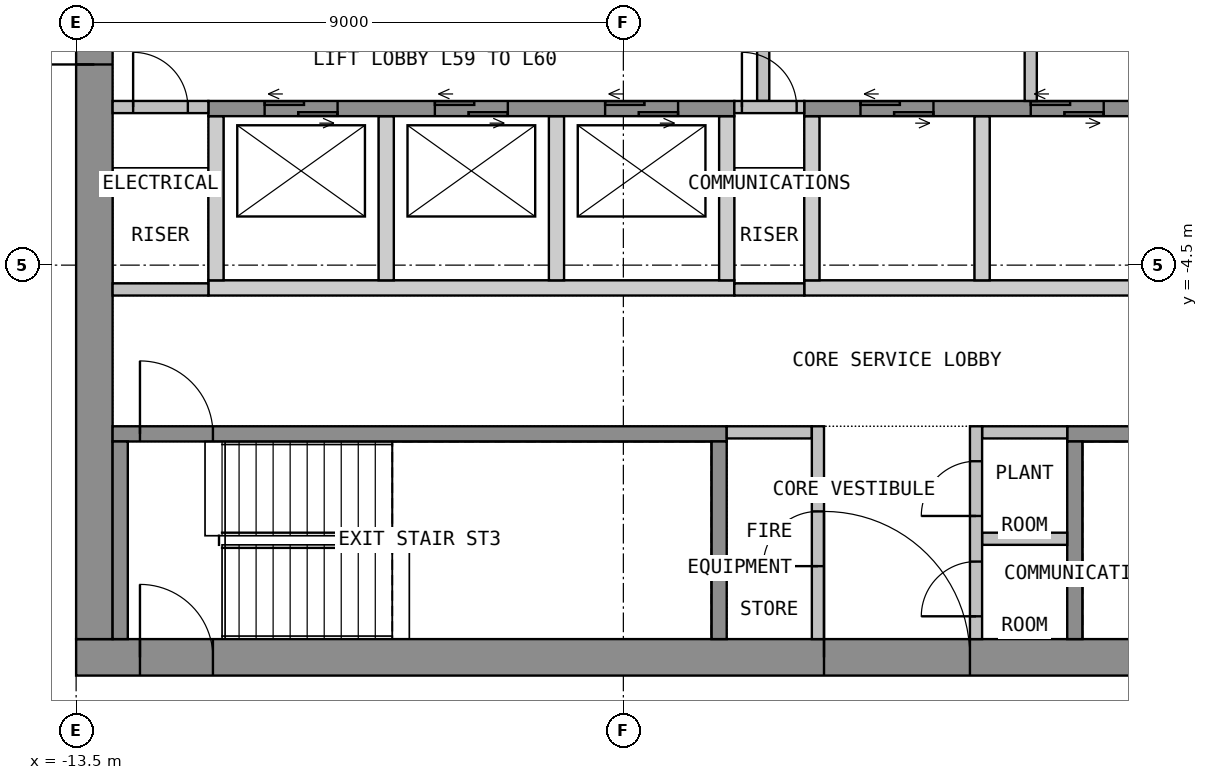
"""IFC4 building model, lengths in metres.
Left out: names, types, materials, properties, quantities, classifications, styles, units other than length and angle.
Written with IfcOpenShell. Run it as: python <this file> out.ifc"""

import sys

from ifc_helpers import new_model, si_unit, direction, frame, frame_2d, origin, place, context, subcontext, project, spatial, polyline, rectangle, outline, extrude, element, fill, save


model = new_model("IFC4")
c1 = context("Model", 3, precision=1e-05, world=origin(), true_north=direction((0.0, 1.0)))
c2 = subcontext(c1, "Body", "Model", "MODEL_VIEW")
j1 = project(units=[si_unit("LENGTHUNIT", "METRE"), si_unit("PLANEANGLEUNIT", "RADIAN")], contexts=[c1])
p1 = place(None, origin())
s1 = spatial("IfcSite", under=j1, at=p1, CompositionType="ELEMENT")
p2 = place(p1, origin())
s2 = spatial("IfcBuilding", under=s1, at=p2, CompositionType="ELEMENT")
p3 = place(p2, frame((0.0, 0.0, 235.2)))
s3 = spatial("IfcBuildingStorey", under=s2, at=p3, CompositionType="ELEMENT", Elevation=235.2)
p4 = place(p3, frame((-13.5, -10.95, 0.0), z_axis=(0.0, 0.0, 1.0), x_axis=(1.0, 0.0, 0.0)))
e1 = element("IfcWall", 1, at=p4, inside=s3, PredefinedType="SHEAR", context=c2, shape_type="SweptSolid", body=[
    extrude(rectangle(XDim=27.0, YDim=0.6, at=frame_2d((13.5, 0.0))), origin(), (0.0, 0.0, 1.0), 3.575),
])
p5 = place(p4, frame((12.3, 0.0, 0.0)))
e2 = element("IfcOpeningElement", 2, at=p5, cuts=e1, PredefinedType="OPENING", context=c2, shape_type="SweptSolid", body=[
    extrude(rectangle(XDim=2.4, YDim=2.1, at=frame_2d((1.2, 1.05))), frame((0.0, 0.31, 0.0), z_axis=(0.0, -1.0, 0.0), x_axis=(1.0, 0.0, 0.0)), (0.0, 0.0, 1.0), 0.62),
])
p6 = place(p4, frame((1.05, 0.0, 0.0)))
e3 = element("IfcOpeningElement", 3, at=p6, cuts=e1, PredefinedType="OPENING", context=c2, shape_type="SweptSolid", body=[
    extrude(rectangle(XDim=1.2, YDim=2.1, at=frame_2d((0.6, 1.05))), frame((0.0, 0.31, 0.0), z_axis=(0.0, -1.0, 0.0), x_axis=(1.0, 0.0, 0.0)), (0.0, 0.0, 1.0), 0.62),
])
p7 = place(p4, frame((24.75, 0.0, 0.0)))
e4 = element("IfcOpeningElement", 4, at=p7, cuts=e1, PredefinedType="OPENING", context=c2, shape_type="SweptSolid", body=[
    extrude(rectangle(XDim=1.2, YDim=2.1, at=frame_2d((0.6, 1.05))), frame((0.0, 0.31, 0.0), z_axis=(0.0, -1.0, 0.0), x_axis=(1.0, 0.0, 0.0)), (0.0, 0.0, 1.0), 0.62),
])
p8 = place(p3, frame((-13.2, -10.65, 0.0), z_axis=(0.0, 0.0, 1.0), x_axis=(0.0, 1.0, 0.0)))
e5 = element("IfcWall", 5, at=p8, inside=s3, PredefinedType="SHEAR", context=c2, shape_type="SweptSolid", body=[
    extrude(rectangle(XDim=21.3, YDim=0.6, at=frame_2d((10.65, 0.0))), origin(), (0.0, 0.0, 1.0), 3.575),
])
p9 = place(p8, frame((9.45, 0.0, 0.0)))
e6 = element("IfcOpeningElement", 6, at=p9, cuts=e5, PredefinedType="OPENING", context=c2, shape_type="SweptSolid", body=[
    extrude(rectangle(XDim=2.4, YDim=2.1, at=frame_2d((1.2, 1.05))), frame((0.0, 0.31, 0.0), z_axis=(0.0, -1.0, 0.0), x_axis=(1.0, 0.0, 0.0)), (0.0, 0.0, 1.0), 0.62),
])
p10 = place(p3, origin())
e7 = element("IfcWall", 7, at=p10, inside=s3, PredefinedType="SHEAR", context=c2, shape_type="SweptSolid", body=[
    extrude(outline(polyline([(-11.325, -5.0), (-2.675, -5.0), (-2.675, -4.75), (-11.325, -4.75), (-11.325, -5.0)])), origin(), (0.0, 0.0, 1.0), 3.575),
])
p11 = place(p3, origin())
e8 = element("IfcWall", 8, at=p11, inside=s3, PredefinedType="SHEAR", context=c2, shape_type="SweptSolid", body=[
    extrude(outline(polyline([(-1.525, -5.0), (12.9, -5.0), (12.9, -4.75), (-1.525, -4.75), (-1.525, -5.0)])), origin(), (0.0, 0.0, 1.0), 3.575),
])
p12 = place(p3, origin())
e9 = element("IfcWall", 9, at=p12, inside=s3, PredefinedType="SHEAR", context=c2, shape_type="SweptSolid", body=[
    extrude(outline(polyline([(-11.325, -4.75), (-11.075, -4.75), (-11.075, -2.05), (-11.325, -2.05), (-11.325, -4.75)])), origin(), (0.0, 0.0, 1.0), 3.575),
])
p13 = place(p3, origin())
e10 = element("IfcWall", 10, at=p13, inside=s3, PredefinedType="SHEAR", context=c2, shape_type="SweptSolid", body=[
    extrude(outline(polyline([(-8.525, -4.75), (-8.275, -4.75), (-8.275, -2.05), (-8.525, -2.05), (-8.525, -4.75)])), origin(), (0.0, 0.0, 1.0), 3.575),
])
p14 = place(p3, origin())
e11 = element("IfcWall", 11, at=p14, inside=s3, PredefinedType="SHEAR", context=c2, shape_type="SweptSolid", body=[
    extrude(outline(polyline([(-5.725, -4.75), (-5.475, -4.75), (-5.475, -2.05), (-5.725, -2.05), (-5.725, -4.75)])), origin(), (0.0, 0.0, 1.0), 3.575),
])
p15 = place(p3, origin())
e12 = element("IfcWall", 12, at=p15, inside=s3, PredefinedType="SHEAR", context=c2, shape_type="SweptSolid", body=[
    extrude(outline(polyline([(-2.925, -4.75), (-2.675, -4.75), (-2.675, -2.05), (-2.925, -2.05), (-2.925, -4.75)])), origin(), (0.0, 0.0, 1.0), 3.575),
])
p16 = place(p3, origin())
e13 = element("IfcWall", 13, at=p16, inside=s3, PredefinedType="SHEAR", context=c2, shape_type="SweptSolid", body=[
    extrude(outline(polyline([(-1.525, -4.75), (-1.275, -4.75), (-1.275, -2.05), (-1.525, -2.05), (-1.525, -4.75)])), origin(), (0.0, 0.0, 1.0), 3.575),
])
p17 = place(p3, origin())
e14 = element("IfcWall", 14, at=p17, inside=s3, PredefinedType="SHEAR", context=c2, shape_type="SweptSolid", body=[
    extrude(outline(polyline([(1.275, -4.75), (1.525, -4.75), (1.525, -2.05), (1.275, -2.05), (1.275, -4.75)])), origin(), (0.0, 0.0, 1.0), 3.575),
])
p18 = place(p3, frame((-11.325, -1.925, 0.0), z_axis=(0.0, 0.0, 1.0), x_axis=(1.0, 0.0, 0.0)))
e15 = element("IfcWall", 15, at=p18, inside=s3, PredefinedType="SHEAR", context=c2, shape_type="SweptSolid", body=[
    extrude(rectangle(XDim=8.65, YDim=0.25, at=frame_2d((4.325, 0.0))), origin(), (0.0, 0.0, 1.0), 3.575),
])
p19 = place(p18, frame((0.925, 0.0, 0.0)))
e16 = element("IfcOpeningElement", 16, at=p19, cuts=e15, PredefinedType="OPENING", context=c2, shape_type="SweptSolid", body=[
    extrude(rectangle(XDim=1.2, YDim=2.1, at=frame_2d((0.6, 1.05))), frame((0.0, 0.135, 0.0), z_axis=(0.0, -1.0, 0.0), x_axis=(1.0, 0.0, 0.0)), (0.0, 0.0, 1.0), 0.27),
])
p20 = place(p18, frame((3.725, 0.0, 0.0)))
e17 = element("IfcOpeningElement", 17, at=p20, cuts=e15, PredefinedType="OPENING", context=c2, shape_type="SweptSolid", body=[
    extrude(rectangle(XDim=1.2, YDim=2.1, at=frame_2d((0.6, 1.05))), frame((0.0, 0.135, 0.0), z_axis=(0.0, -1.0, 0.0), x_axis=(1.0, 0.0, 0.0)), (0.0, 0.0, 1.0), 0.27),
])
p21 = place(p18, frame((6.525, 0.0, 0.0)))
e18 = element("IfcOpeningElement", 18, at=p21, cuts=e15, PredefinedType="OPENING", context=c2, shape_type="SweptSolid", body=[
    extrude(rectangle(XDim=1.2, YDim=2.1, at=frame_2d((0.6, 1.05))), frame((0.0, 0.135, 0.0), z_axis=(0.0, -1.0, 0.0), x_axis=(1.0, 0.0, 0.0)), (0.0, 0.0, 1.0), 0.27),
])
p22 = place(p3, frame((-1.525, -1.925, 0.0), z_axis=(0.0, 0.0, 1.0), x_axis=(1.0, 0.0, 0.0)))
e19 = element("IfcWall", 19, at=p22, inside=s3, PredefinedType="SHEAR", context=c2, shape_type="SweptSolid", body=[
    extrude(rectangle(XDim=14.425, YDim=0.25, at=frame_2d((7.212, 0.0))), origin(), (0.0, 0.0, 1.0), 3.575),
])
p23 = place(p22, frame((0.925, 0.0, 0.0)))
e20 = element("IfcOpeningElement", 20, at=p23, cuts=e19, PredefinedType="OPENING", context=c2, shape_type="SweptSolid", body=[
    extrude(rectangle(XDim=1.2, YDim=2.1, at=frame_2d((0.6, 1.05))), frame((0.0, 0.135, 0.0), z_axis=(0.0, -1.0, 0.0), x_axis=(1.0, 0.0, 0.0)), (0.0, 0.0, 1.0), 0.27),
])
p24 = place(p22, frame((3.725, 0.0, 0.0)))
e21 = element("IfcOpeningElement", 21, at=p24, cuts=e19, PredefinedType="OPENING", context=c2, shape_type="SweptSolid", body=[
    extrude(rectangle(XDim=1.2, YDim=2.1, at=frame_2d((0.6, 1.05))), frame((0.0, 0.135, 0.0), z_axis=(0.0, -1.0, 0.0), x_axis=(1.0, 0.0, 0.0)), (0.0, 0.0, 1.0), 0.27),
])
p25 = place(p22, frame((6.525, 0.0, 0.0)))
e22 = element("IfcOpeningElement", 22, at=p25, cuts=e19, PredefinedType="OPENING", context=c2, shape_type="SweptSolid", body=[
    extrude(rectangle(XDim=1.2, YDim=2.1, at=frame_2d((0.6, 1.05))), frame((0.0, 0.135, 0.0), z_axis=(0.0, -1.0, 0.0), x_axis=(1.0, 0.0, 0.0)), (0.0, 0.0, 1.0), 0.27),
])
p26 = place(p22, frame((9.325, 0.0, 0.0)))
e23 = element("IfcOpeningElement", 23, at=p26, cuts=e19, PredefinedType="OPENING", context=c2, shape_type="SweptSolid", body=[
    extrude(rectangle(XDim=1.2, YDim=2.1, at=frame_2d((0.6, 1.05))), frame((0.0, 0.135, 0.0), z_axis=(0.0, -1.0, 0.0), x_axis=(1.0, 0.0, 0.0)), (0.0, 0.0, 1.0), 0.27),
])
p27 = place(p22, frame((12.125, 0.0, 0.0)))
e24 = element("IfcOpeningElement", 24, at=p27, cuts=e19, PredefinedType="OPENING", context=c2, shape_type="SweptSolid", body=[
    extrude(rectangle(XDim=1.2, YDim=2.1, at=frame_2d((0.6, 1.05))), frame((0.0, 0.135, 0.0), z_axis=(0.0, -1.0, 0.0), x_axis=(1.0, 0.0, 0.0)), (0.0, 0.0, 1.0), 0.27),
])
p28 = place(p3, frame((-2.2, -1.8, 0.0), z_axis=(0.0, 0.0, 1.0), x_axis=(0.0, 1.0, 0.0)))
e25 = element("IfcWall", 25, at=p28, inside=s3, PredefinedType="PARTITIONING", context=c2, shape_type="SweptSolid", body=[
    extrude(rectangle(XDim=3.6, YDim=0.2, at=frame_2d((1.8, 0.0))), origin(), (0.0, 0.0, 1.0), 3.575),
])
p29 = place(p28, frame((1.2, 0.0, 0.0)))
e26 = element("IfcOpeningElement", 26, at=p29, cuts=e25, PredefinedType="OPENING", context=c2, shape_type="SweptSolid", body=[
    extrude(rectangle(XDim=1.2, YDim=2.1, at=frame_2d((0.6, 1.05))), frame((0.0, 0.11, 0.0), z_axis=(0.0, -1.0, 0.0), x_axis=(1.0, 0.0, 0.0)), (0.0, 0.0, 1.0), 0.22),
])
p30 = place(p3, frame((2.2, -1.8, 0.0), z_axis=(0.0, 0.0, 1.0), x_axis=(0.0, 1.0, 0.0)))
e27 = element("IfcWall", 27, at=p30, inside=s3, PredefinedType="PARTITIONING", context=c2, shape_type="SweptSolid", body=[
    extrude(rectangle(XDim=3.6, YDim=0.2, at=frame_2d((1.8, 0.0))), origin(), (0.0, 0.0, 1.0), 3.575),
])
p31 = place(p30, frame((1.2, 0.0, 0.0)))
e28 = element("IfcOpeningElement", 28, at=p31, cuts=e27, PredefinedType="OPENING", context=c2, shape_type="SweptSolid", body=[
    extrude(rectangle(XDim=1.2, YDim=2.1, at=frame_2d((0.6, 1.05))), frame((0.0, 0.11, 0.0), z_axis=(0.0, -1.0, 0.0), x_axis=(1.0, 0.0, 0.0)), (0.0, 0.0, 1.0), 0.22),
])
p32 = place(p3, frame((-12.9, -7.275, 0.0), z_axis=(0.0, 0.0, 1.0), x_axis=(1.0, 0.0, 0.0)))
e29 = element("IfcWall", 29, at=p32, inside=s3, PredefinedType="SHEAR", context=c2, shape_type="SweptSolid", body=[
    extrude(rectangle(XDim=10.1, YDim=0.25, at=frame_2d((5.05, 0.0))), origin(), (0.0, 0.0, 1.0), 3.575),
])
p33 = place(p32, frame((0.45, 0.0, 0.0)))
e30 = element("IfcOpeningElement", 30, at=p33, cuts=e29, PredefinedType="OPENING", context=c2, shape_type="SweptSolid", body=[
    extrude(rectangle(XDim=1.2, YDim=2.1, at=frame_2d((0.6, 1.05))), frame((0.0, 0.135, 0.0), z_axis=(0.0, -1.0, 0.0), x_axis=(1.0, 0.0, 0.0)), (0.0, 0.0, 1.0), 0.27),
])
for number, where, z_axis, x_axis in (
    (31, (-12.775, -10.65, 0.0), (0.0, 0.0, 1.0), (0.0, 1.0, 0.0)),
    (32, (-2.925, -10.65, 0.0), (0.0, 0.0, 1.0), (0.0, 1.0, 0.0)),
):
    element("IfcWall", number, at=place(p3, frame(where, z_axis=z_axis, x_axis=x_axis)), inside=s3, PredefinedType="SHEAR", context=c2, shape_type="SweptSolid", body=[
        extrude(rectangle(XDim=3.25, YDim=0.25, at=frame_2d((1.625, 0.0))), origin(), (0.0, 0.0, 1.0), 3.575),
    ])
p34 = place(p3, frame((2.8, -7.275, 0.0), z_axis=(0.0, 0.0, 1.0), x_axis=(1.0, 0.0, 0.0)))
e33 = element("IfcWall", 33, at=p34, inside=s3, PredefinedType="SHEAR", context=c2, shape_type="SweptSolid", body=[
    extrude(rectangle(XDim=10.1, YDim=0.25, at=frame_2d((5.05, 0.0))), origin(), (0.0, 0.0, 1.0), 3.575),
])
p35 = place(p34, frame((8.45, 0.0, 0.0)))
e34 = element("IfcOpeningElement", 34, at=p35, cuts=e33, PredefinedType="OPENING", context=c2, shape_type="SweptSolid", body=[
    extrude(rectangle(XDim=1.2, YDim=2.1, at=frame_2d((0.6, 1.05))), frame((0.0, 0.135, 0.0), z_axis=(0.0, -1.0, 0.0), x_axis=(1.0, 0.0, 0.0)), (0.0, 0.0, 1.0), 0.27),
])
p36 = place(p3, frame((2.925, -10.65, 0.0), z_axis=(0.0, 0.0, 1.0), x_axis=(0.0, 1.0, 0.0)))
e35 = element("IfcWall", 35, at=p36, inside=s3, PredefinedType="SHEAR", context=c2, shape_type="SweptSolid", body=[
    extrude(rectangle(XDim=3.25, YDim=0.25, at=frame_2d((1.625, 0.0))), origin(), (0.0, 0.0, 1.0), 3.575),
])
for number, where, z_axis, x_axis in (
    (36, (-2.8, -7.25, 0.0), (0.0, 0.0, 1.0), (1.0, 0.0, 0.0)),
    (37, (1.4, -7.25, 0.0), (0.0, 0.0, 1.0), (1.0, 0.0, 0.0)),
    (38, (1.4, -9.0, 0.0), (0.0, 0.0, 1.0), (1.0, 0.0, 0.0)),
):
    element("IfcWall", number, at=place(p3, frame(where, z_axis=z_axis, x_axis=x_axis)), inside=s3, PredefinedType="PARTITIONING", context=c2, shape_type="SweptSolid", body=[
        extrude(rectangle(XDim=1.4, YDim=0.2, at=frame_2d((0.7, 0.0))), origin(), (0.0, 0.0, 1.0), 3.575),
    ])
p37 = place(p3, frame((-1.3, -10.65, 0.0), z_axis=(0.0, 0.0, 1.0), x_axis=(0.0, 1.0, 0.0)))
e39 = element("IfcWall", 39, at=p37, inside=s3, PredefinedType="PARTITIONING", context=c2, shape_type="SweptSolid", body=[
    extrude(rectangle(XDim=3.5, YDim=0.2, at=frame_2d((1.75, 0.0))), origin(), (0.0, 0.0, 1.0), 3.575),
])
p38 = place(p37, frame((1.2, 0.0, 0.0)))
e40 = element("IfcOpeningElement", 40, at=p38, cuts=e39, PredefinedType="OPENING", context=c2, shape_type="SweptSolid", body=[
    extrude(rectangle(XDim=0.9, YDim=2.1, at=frame_2d((0.45, 1.05))), frame((0.0, 0.11, 0.0), z_axis=(0.0, -1.0, 0.0), x_axis=(1.0, 0.0, 0.0)), (0.0, 0.0, 1.0), 0.22),
])
p39 = place(p3, frame((1.3, -10.65, 0.0), z_axis=(0.0, 0.0, 1.0), x_axis=(0.0, 1.0, 0.0)))
e41 = element("IfcWall", 41, at=p39, inside=s3, PredefinedType="PARTITIONING", context=c2, shape_type="SweptSolid", body=[
    extrude(rectangle(XDim=3.5, YDim=0.2, at=frame_2d((1.75, 0.0))), origin(), (0.0, 0.0, 1.0), 3.575),
])
p40 = place(p39, frame((0.375, 0.0, 0.0)))
e42 = element("IfcOpeningElement", 42, at=p40, cuts=e41, PredefinedType="OPENING", context=c2, shape_type="SweptSolid", body=[
    extrude(rectangle(XDim=0.9, YDim=2.1, at=frame_2d((0.45, 1.05))), frame((0.0, 0.11, 0.0), z_axis=(0.0, -1.0, 0.0), x_axis=(1.0, 0.0, 0.0)), (0.0, 0.0, 1.0), 0.22),
])
p41 = place(p39, frame((2.025, 0.0, 0.0)))
e43 = element("IfcOpeningElement", 43, at=p41, cuts=e41, PredefinedType="OPENING", context=c2, shape_type="SweptSolid", body=[
    extrude(rectangle(XDim=0.9, YDim=2.1, at=frame_2d((0.45, 1.05))), frame((0.0, 0.11, 0.0), z_axis=(0.0, -1.0, 0.0), x_axis=(1.0, 0.0, 0.0)), (0.0, 0.0, 1.0), 0.22),
])
p42 = place(p3, frame((-12.9, -1.9, 0.0), z_axis=(0.0, 0.0, 1.0), x_axis=(1.0, 0.0, 0.0)))
e44 = element("IfcWall", 44, at=p42, inside=s3, PredefinedType="PARTITIONING", context=c2, shape_type="SweptSolid", body=[
    extrude(rectangle(XDim=1.575, YDim=0.2, at=frame_2d((0.788, 0.0))), origin(), (0.0, 0.0, 1.0), 3.575),
])
p43 = place(p42, frame((0.337, 0.0, 0.0)))
e45 = element("IfcOpeningElement", 45, at=p43, cuts=e44, PredefinedType="OPENING", context=c2, shape_type="SweptSolid", body=[
    extrude(rectangle(XDim=0.9, YDim=2.1, at=frame_2d((0.45, 1.05))), frame((0.0, 0.11, 0.0), z_axis=(0.0, -1.0, 0.0), x_axis=(1.0, 0.0, 0.0)), (0.0, 0.0, 1.0), 0.22),
])
p44 = place(p3, frame((-12.9, -4.9, 0.0), z_axis=(0.0, 0.0, 1.0), x_axis=(1.0, 0.0, 0.0)))
e46 = element("IfcWall", 46, at=p44, inside=s3, PredefinedType="PARTITIONING", context=c2, shape_type="SweptSolid", body=[
    extrude(rectangle(XDim=1.575, YDim=0.2, at=frame_2d((0.788, 0.0))), origin(), (0.0, 0.0, 1.0), 3.575),
])
p45 = place(p3, frame((-2.675, -1.9, 0.0), z_axis=(0.0, 0.0, 1.0), x_axis=(1.0, 0.0, 0.0)))
e47 = element("IfcWall", 47, at=p45, inside=s3, PredefinedType="PARTITIONING", context=c2, shape_type="SweptSolid", body=[
    extrude(rectangle(XDim=1.15, YDim=0.2, at=frame_2d((0.575, 0.0))), origin(), (0.0, 0.0, 1.0), 3.575),
])
p46 = place(p45, frame((0.125, 0.0, 0.0)))
e48 = element("IfcOpeningElement", 48, at=p46, cuts=e47, PredefinedType="OPENING", context=c2, shape_type="SweptSolid", body=[
    extrude(rectangle(XDim=0.9, YDim=2.1, at=frame_2d((0.45, 1.05))), frame((0.0, 0.11, 0.0), z_axis=(0.0, -1.0, 0.0), x_axis=(1.0, 0.0, 0.0)), (0.0, 0.0, 1.0), 0.22),
])
p47 = place(p3, frame((-2.675, -4.9, 0.0), z_axis=(0.0, 0.0, 1.0), x_axis=(1.0, 0.0, 0.0)))
e49 = element("IfcWall", 49, at=p47, inside=s3, PredefinedType="PARTITIONING", context=c2, shape_type="SweptSolid", body=[
    extrude(rectangle(XDim=1.15, YDim=0.2, at=frame_2d((0.575, 0.0))), origin(), (0.0, 0.0, 1.0), 3.575),
])
p48 = place(p9, origin())
e50 = element("IfcDoor", 50, at=p48, inside=s3, OperationType="DOUBLE_DOOR_DOUBLE_SWING", PredefinedType="DOOR", context=c2, shape_type="SweptSolid", body=[
    extrude(rectangle(XDim=2.4, YDim=2.1, at=frame_2d((1.2, 1.05))), frame((0.0, 0.025, 0.0), z_axis=(0.0, -1.0, 0.0), x_axis=(1.0, 0.0, 0.0)), (0.0, 0.0, 1.0), 0.05),
])
fill(e6, e50)
p49 = place(p5, origin())
e51 = element("IfcDoor", 51, at=p49, inside=s3, OperationType="DOUBLE_DOOR_DOUBLE_SWING", PredefinedType="DOOR", context=c2, shape_type="SweptSolid", body=[
    extrude(rectangle(XDim=2.4, YDim=2.1, at=frame_2d((1.2, 1.05))), frame((0.0, 0.025, 0.0), z_axis=(0.0, -1.0, 0.0), x_axis=(1.0, 0.0, 0.0)), (0.0, 0.0, 1.0), 0.05),
])
fill(e2, e51)
p50 = place(p6, origin())
e52 = element("IfcDoor", 52, at=p50, inside=s3, OperationType="SINGLE_SWING_RIGHT", PredefinedType="DOOR", context=c2, shape_type="SweptSolid", body=[
    extrude(rectangle(XDim=1.2, YDim=2.1, at=frame_2d((0.6, 1.05))), frame((0.0, 0.025, 0.0), z_axis=(0.0, -1.0, 0.0), x_axis=(1.0, 0.0, 0.0)), (0.0, 0.0, 1.0), 0.05),
])
fill(e3, e52)
p51 = place(p19, origin())
e53 = element("IfcDoor", 53, at=p51, inside=s3, OperationType="DOUBLE_DOOR_SLIDING", PredefinedType="DOOR", context=c2, shape_type="SweptSolid", body=[
    extrude(rectangle(XDim=1.2, YDim=2.1, at=frame_2d((0.6, 1.05))), frame((0.0, 0.025, 0.0), z_axis=(0.0, -1.0, 0.0), x_axis=(1.0, 0.0, 0.0)), (0.0, 0.0, 1.0), 0.05),
])
fill(e16, e53)
p52 = place(p20, origin())
e54 = element("IfcDoor", 54, at=p52, inside=s3, OperationType="DOUBLE_DOOR_SLIDING", PredefinedType="DOOR", context=c2, shape_type="SweptSolid", body=[
    extrude(rectangle(XDim=1.2, YDim=2.1, at=frame_2d((0.6, 1.05))), frame((0.0, 0.025, 0.0), z_axis=(0.0, -1.0, 0.0), x_axis=(1.0, 0.0, 0.0)), (0.0, 0.0, 1.0), 0.05),
])
fill(e17, e54)
p53 = place(p21, origin())
e55 = element("IfcDoor", 55, at=p53, inside=s3, OperationType="DOUBLE_DOOR_SLIDING", PredefinedType="DOOR", context=c2, shape_type="SweptSolid", body=[
    extrude(rectangle(XDim=1.2, YDim=2.1, at=frame_2d((0.6, 1.05))), frame((0.0, 0.025, 0.0), z_axis=(0.0, -1.0, 0.0), x_axis=(1.0, 0.0, 0.0)), (0.0, 0.0, 1.0), 0.05),
])
fill(e18, e55)
p54 = place(p23, origin())
e56 = element("IfcDoor", 56, at=p54, inside=s3, OperationType="DOUBLE_DOOR_SLIDING", PredefinedType="DOOR", context=c2, shape_type="SweptSolid", body=[
    extrude(rectangle(XDim=1.2, YDim=2.1, at=frame_2d((0.6, 1.05))), frame((0.0, 0.025, 0.0), z_axis=(0.0, -1.0, 0.0), x_axis=(1.0, 0.0, 0.0)), (0.0, 0.0, 1.0), 0.05),
])
fill(e20, e56)
p55 = place(p24, origin())
e57 = element("IfcDoor", 57, at=p55, inside=s3, OperationType="DOUBLE_DOOR_SLIDING", PredefinedType="DOOR", context=c2, shape_type="SweptSolid", body=[
    extrude(rectangle(XDim=1.2, YDim=2.1, at=frame_2d((0.6, 1.05))), frame((0.0, 0.025, 0.0), z_axis=(0.0, -1.0, 0.0), x_axis=(1.0, 0.0, 0.0)), (0.0, 0.0, 1.0), 0.05),
])
fill(e21, e57)
p56 = place(p33, origin())
e58 = element("IfcDoor", 58, at=p56, inside=s3, OperationType="SINGLE_SWING_LEFT", PredefinedType="DOOR", context=c2, shape_type="SweptSolid", body=[
    extrude(rectangle(XDim=1.2, YDim=2.1, at=frame_2d((0.6, 1.05))), frame((0.0, 0.025, 0.0), z_axis=(0.0, -1.0, 0.0), x_axis=(1.0, 0.0, 0.0)), (0.0, 0.0, 1.0), 0.05),
])
fill(e30, e58)
p57 = place(p38, origin())
e59 = element("IfcDoor", 59, at=p57, inside=s3, OperationType="SINGLE_SWING_LEFT", PredefinedType="DOOR", context=c2, shape_type="SweptSolid", body=[
    extrude(rectangle(XDim=0.9, YDim=2.1, at=frame_2d((0.45, 1.05))), frame((0.0, 0.025, 0.0), z_axis=(0.0, -1.0, 0.0), x_axis=(1.0, 0.0, 0.0)), (0.0, 0.0, 1.0), 0.05),
])
fill(e40, e59)
p58 = place(p40, origin())
e60 = element("IfcDoor", 60, at=p58, inside=s3, OperationType="SINGLE_SWING_LEFT", PredefinedType="DOOR", context=c2, shape_type="SweptSolid", body=[
    extrude(rectangle(XDim=0.9, YDim=2.1, at=frame_2d((0.45, 1.05))), frame((0.0, 0.025, 0.0), z_axis=(0.0, -1.0, 0.0), x_axis=(1.0, 0.0, 0.0)), (0.0, 0.0, 1.0), 0.05),
])
fill(e42, e60)
p59 = place(p41, origin())
e61 = element("IfcDoor", 61, at=p59, inside=s3, OperationType="SINGLE_SWING_LEFT", PredefinedType="DOOR", context=c2, shape_type="SweptSolid", body=[
    extrude(rectangle(XDim=0.9, YDim=2.1, at=frame_2d((0.45, 1.05))), frame((0.0, 0.025, 0.0), z_axis=(0.0, -1.0, 0.0), x_axis=(1.0, 0.0, 0.0)), (0.0, 0.0, 1.0), 0.05),
])
fill(e43, e61)
p60 = place(p43, origin())
e62 = element("IfcDoor", 62, at=p60, inside=s3, OperationType="SINGLE_SWING_LEFT", PredefinedType="DOOR", context=c2, shape_type="SweptSolid", body=[
    extrude(rectangle(XDim=0.9, YDim=2.1, at=frame_2d((0.45, 1.05))), frame((0.0, 0.025, 0.0), z_axis=(0.0, -1.0, 0.0), x_axis=(1.0, 0.0, 0.0)), (0.0, 0.0, 1.0), 0.05),
])
fill(e45, e62)
p61 = place(p46, origin())
e63 = element("IfcDoor", 63, at=p61, inside=s3, OperationType="SINGLE_SWING_LEFT", PredefinedType="DOOR", context=c2, shape_type="SweptSolid", body=[
    extrude(rectangle(XDim=0.9, YDim=2.1, at=frame_2d((0.45, 1.05))), frame((0.0, 0.025, 0.0), z_axis=(0.0, -1.0, 0.0), x_axis=(1.0, 0.0, 0.0)), (0.0, 0.0, 1.0), 0.05),
])
fill(e48, e63)
save(model, sys.argv[1])
